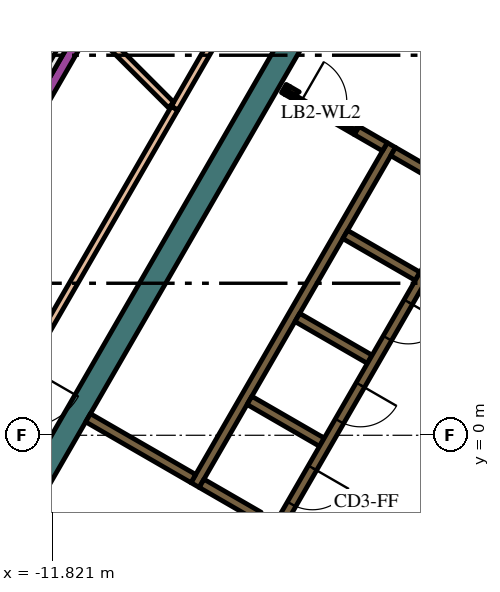
"""IFC4 building model, lengths in metres.
Left out: names, types, materials, properties, quantities, classifications, styles, units other than length and angle.
Written with IfcOpenShell. Run it as: python <this file> out.ifc"""

import sys

from ifc_helpers import new_model, si_unit, direction, frame, frame_2d, origin, place, context, subcontext, project, spatial, polyline, rectangle, outline, extrude, element, fill, save


model = new_model("IFC4")
c1 = context("Model", 3, precision=1e-05, world=origin(), true_north=direction((0.0, 1.0)))
c2 = subcontext(c1, "Body", "Model", "MODEL_VIEW")
j1 = project(units=[si_unit("LENGTHUNIT", "METRE"), si_unit("PLANEANGLEUNIT", "RADIAN")], contexts=[c1])
p1 = place(None, origin())
s1 = spatial("IfcSite", under=j1, at=p1, CompositionType="ELEMENT")
p2 = place(p1, origin())
s2 = spatial("IfcBuilding", under=s1, at=p2, CompositionType="ELEMENT")
p3 = place(p2, frame((0.0, 0.0, 340.2)))
s3 = spatial("IfcBuildingStorey", under=s2, at=p3, CompositionType="ELEMENT", Elevation=340.2)
p4 = place(p3, frame((-4.652, 11.842, 0.0), z_axis=(0.0, 0.0, 1.0), x_axis=(-0.500003640647, -0.866023301845, 0.0)))
e1 = element("IfcWall", 1, at=p4, inside=s3, PredefinedType="SOLIDWALL", context=c2, shape_type="SweptSolid", body=[
    extrude(rectangle(XDim=15.858, YDim=0.6, at=frame_2d((7.929, 0.0))), origin(), (0.0, 0.0, 1.0), 4.2),
])
p5 = place(p3, frame((-8.06, -1.311, 0.0), z_axis=(0.0, 0.0, 1.0), x_axis=(0.50000273126, 0.866023826885, 0.0)))
e2 = element("IfcWall", 2, at=p5, inside=s3, PredefinedType="SOLIDWALL", context=c2, shape_type="SweptSolid", body=[
    extrude(rectangle(XDim=10.33, YDim=0.25, at=frame_2d((5.165, 0.0))), origin(), (0.0, 0.0, 1.0), 4.2),
])
p6 = place(p3, origin())
e3 = element("IfcWall", 3, at=p6, inside=s3, PredefinedType="SOLIDWALL", context=c2, shape_type="SweptSolid", body=[
    extrude(outline(polyline([(-2.912, 7.356), (-2.787, 7.573), (-1.232, 6.675), (-1.303, 6.675), (-1.304, 6.675), (-1.304, 6.675), (-1.304, 6.525), (-1.304, 6.525), (-1.303, 6.525), (-0.971, 6.525), (-0.665, 6.348), (-0.79, 6.132), (-1.007, 6.257), (-1.007, 6.257), (-2.912, 7.356)])), origin(), (0.0, 0.0, 1.0), 4.2),
])
for number, where, z_axis, x_axis in (
    (4, (-2.204, 4.182, 0.0), (0.0, 0.0, 1.0), (-0.866, 0.5, 0.0)),
    (5, (-5.369, 3.1, 0.0), (0.0, 0.0, 1.0), (0.866, -0.5, 0.0)),
    (6, (-4.724, -0.182, 0.0), (0.0, 0.0, 1.0), (-0.866, 0.5, 0.0)),
):
    element("IfcWall", number, at=place(p3, frame(where, z_axis=z_axis, x_axis=x_axis)), inside=s3, PredefinedType="SOLIDWALL", context=c2, shape_type="SweptSolid", body=[
        extrude(rectangle(XDim=2.2, YDim=0.25, at=frame_2d((1.1, 0.0))), origin(), (0.0, 0.0, 1.0), 4.2),
    ])
p7 = place(p3, frame((-7.889, -1.265, 0.0), z_axis=(0.0, 0.0, 1.0), x_axis=(0.865986741702, -0.500066958712, 0.0)))
e7 = element("IfcWall", 7, at=p7, inside=s3, PredefinedType="SOLIDWALL", context=c2, shape_type="SweptSolid", body=[
    extrude(rectangle(XDim=1.738, YDim=0.25, at=frame_2d((0.869, 0.0))), origin(), (0.0, 0.0, 1.0), 4.2),
])
p8 = place(p3, frame((-8.106, -1.14, 0.0), z_axis=(0.0, 0.0, 1.0), x_axis=(-0.866008981251, 0.500028443584, 0.0)))
e8 = element("IfcWall", 8, at=p8, inside=s3, PredefinedType="SOLIDWALL", context=c2, shape_type="SweptSolid", body=[
    extrude(rectangle(XDim=3.2, YDim=0.25, at=frame_2d((1.6, 0.0))), origin(), (0.0, 0.0, 1.0), 4.2),
])
p9 = place(p3, frame((-5.725, 9.125, 0.0), z_axis=(0.0, 0.0, 1.0), x_axis=(0.866185586049, -0.49972245349, 0.0)))
e9 = element("IfcWall", 9, at=p9, inside=s3, PredefinedType="SOLIDWALL", context=c2, shape_type="SweptSolid", body=[
    extrude(rectangle(XDim=0.11, YDim=0.25, at=frame_2d((0.055, 0.0))), origin(), (0.0, 0.0, 1.0), 4.2),
])
p10 = place(p3, frame((-3.066, 7.59, 0.0), z_axis=(0.0, 0.0, 1.0), x_axis=(-0.866081358704, 0.49990307071, 0.0)))
e10 = element("IfcWall", 10, at=p10, inside=s3, PredefinedType="SOLIDWALL", context=c2, shape_type="SweptSolid", body=[
    extrude(rectangle(XDim=0.858, YDim=0.25, at=frame_2d((0.429, 0.0))), origin(), (0.0, 0.0, 1.0), 4.2),
])
e11 = element("IfcWall", 11, at=p6, inside=s3, PredefinedType="SOLIDWALL", context=c2, shape_type="SweptSolid", body=[
    extrude(outline(polyline([(-3.748, 8.128), (-3.813, 8.015), (-4.027, 8.139), (-4.017, 8.156), (-4.008, 8.173), (-4.0, 8.192), (-3.995, 8.21), (-3.991, 8.23), (-3.99, 8.25), (-3.99, 8.268), (-3.748, 8.128)])), origin(), (0.0, 0.0, 1.0), 4.2),
])
e12 = element("IfcWall", 12, at=p6, inside=s3, PredefinedType="SOLIDWALL", context=c2, shape_type="SweptSolid", body=[
    extrude(outline(polyline([(-5.689, 8.96), (-5.69, 8.961), (-5.565, 9.177), (-5.319, 9.035), (-5.335, 9.026), (-5.351, 9.015), (-5.366, 9.002), (-5.379, 8.988), (-5.392, 8.972), (-5.402, 8.956), (-5.412, 8.939), (-5.629, 9.064), (-5.629, 9.064), (-5.689, 8.96)])), origin(), (0.0, 0.0, 1.0), 4.2),
])
e13 = element("IfcWall", 13, at=p6, inside=s3, PredefinedType="PARTITIONING", context=c2, shape_type="SweptSolid", body=[
    extrude(outline(polyline([(2.017, 3.643), (2.342, 3.456), (-1.822, -3.756), (-2.147, -3.568), (2.017, 3.643)])), origin(), (0.0, 0.0, 1.0), 3.45),
])
p11 = place(p3, frame((-0.898, 6.194, 0.0), z_axis=(0.0, 0.0, 1.0), x_axis=(-0.499996202215, -0.866027596426, 0.0)))
e14 = element("IfcWall", 14, at=p11, inside=s3, PredefinedType="SOLIDWALL", context=c2, shape_type="SweptSolid", body=[
    extrude(rectangle(XDim=9.83, YDim=0.25, at=frame_2d((4.915, 0.0))), origin(), (0.0, 0.0, 1.0), 4.2),
])
p12 = place(p11, frame((0.585, 0.0, 0.0)))
e15 = element("IfcOpeningElement", 15, at=p12, cuts=e14, PredefinedType="OPENING", context=c2, shape_type="SweptSolid", body=[
    extrude(rectangle(XDim=1.1, YDim=2.1, at=frame_2d((0.55, 1.05))), frame((0.0, 0.135, 0.0), z_axis=(0.0, -1.0, 0.0), x_axis=(1.0, 0.0, 0.0)), (0.0, 0.0, 1.0), 0.27),
])
p13 = place(p11, frame((3.105, 0.0, 0.0)))
e16 = element("IfcOpeningElement", 16, at=p13, cuts=e14, PredefinedType="OPENING", context=c2, shape_type="SweptSolid", body=[
    extrude(rectangle(XDim=1.1, YDim=2.1, at=frame_2d((0.55, 1.05))), frame((0.0, 0.135, 0.0), z_axis=(0.0, -1.0, 0.0), x_axis=(1.0, 0.0, 0.0)), (0.0, 0.0, 1.0), 0.27),
])
p14 = place(p11, frame((5.625, 0.0, 0.0)))
e17 = element("IfcOpeningElement", 17, at=p14, cuts=e14, PredefinedType="OPENING", context=c2, shape_type="SweptSolid", body=[
    extrude(rectangle(XDim=1.1, YDim=2.1, at=frame_2d((0.55, 1.05))), frame((0.0, 0.135, 0.0), z_axis=(0.0, -1.0, 0.0), x_axis=(1.0, 0.0, 0.0)), (0.0, 0.0, 1.0), 0.27),
])
p15 = place(p11, frame((8.145, 0.0, 0.0)))
e18 = element("IfcOpeningElement", 18, at=p15, cuts=e14, PredefinedType="OPENING", context=c2, shape_type="SweptSolid", body=[
    extrude(rectangle(XDim=1.1, YDim=2.1, at=frame_2d((0.55, 1.05))), frame((0.0, 0.135, 0.0), z_axis=(0.0, -1.0, 0.0), x_axis=(1.0, 0.0, 0.0)), (0.0, 0.0, 1.0), 0.27),
])
p16 = place(p3, frame((-5.659, 9.012, 0.0), z_axis=(0.0, 0.0, 1.0), x_axis=(0.866009402589, -0.500027713859, 0.0)))
e19 = element("IfcWall", 19, at=p16, inside=s3, PredefinedType="PARTITIONING", context=c2, shape_type="SweptSolid", body=[
    extrude(rectangle(XDim=2.1, YDim=0.12, at=frame_2d((1.05, 0.0))), origin(), (0.0, 0.0, 1.0), 3.45),
])
p17 = place(p16, frame((0.45, 0.0, 0.0)))
e20 = element("IfcOpeningElement", 20, at=p17, cuts=e19, PredefinedType="OPENING", context=c2, shape_type="SweptSolid", body=[
    extrude(rectangle(XDim=1.2, YDim=2.1, at=frame_2d((0.6, 1.05))), frame((0.0, 0.07, 0.0), z_axis=(0.0, -1.0, 0.0), x_axis=(1.0, 0.0, 0.0)), (0.0, 0.0, 1.0), 0.14),
])
p18 = place(p3, frame((-8.602, 8.602, 0.0), z_axis=(0.0, 0.0, 1.0), x_axis=(-0.499992973356, -0.866029460581, 0.0)))
e21 = element("IfcWall", 21, at=p18, inside=s3, PredefinedType="PARTITIONING", context=c2, shape_type="SweptSolid", body=[
    extrude(rectangle(XDim=17.265, YDim=0.2, at=frame_2d((8.632, 0.0))), origin(), (0.0, 0.0, 1.0), 3.45),
])
p19 = place(p18, frame((7.833, 0.0, 0.0)))
e22 = element("IfcOpeningElement", 22, at=p19, cuts=e21, PredefinedType="OPENING", context=c2, shape_type="SweptSolid", body=[
    extrude(rectangle(XDim=1.6, YDim=2.1, at=frame_2d((0.8, 1.05))), frame((0.0, 0.11, 0.0), z_axis=(0.0, -1.0, 0.0), x_axis=(1.0, 0.0, 0.0)), (0.0, 0.0, 1.0), 0.22),
])
p20 = place(p3, frame((-3.118, 18.1, 0.0), z_axis=(0.0, 0.0, 1.0), x_axis=(-0.499996953601, -0.866027162616, 0.0)))
e23 = element("IfcWall", 23, at=p20, inside=s3, PredefinedType="PARTITIONING", context=c2, shape_type="SweptSolid", body=[
    extrude(rectangle(XDim=10.958, YDim=0.2, at=frame_2d((5.479, 0.0))), origin(), (0.0, 0.0, 1.0), 3.45),
])
p21 = place(p20, frame((4.879, 0.0, 0.0)))
e24 = element("IfcOpeningElement", 24, at=p21, cuts=e23, PredefinedType="OPENING", context=c2, shape_type="SweptSolid", body=[
    extrude(rectangle(XDim=1.2, YDim=2.1, at=frame_2d((0.6, 1.05))), frame((0.0, 0.11, 0.0), z_axis=(0.0, -1.0, 0.0), x_axis=(1.0, 0.0, 0.0)), (0.0, 0.0, 1.0), 0.22),
])
p22 = place(p3, frame((-8.694, 8.694, 0.0), z_axis=(0.0, 0.0, 1.0), x_axis=(-0.707106781187, 0.707106781187, 0.0)))
e25 = element("IfcWall", 25, at=p22, inside=s3, PredefinedType="PARTITIONING", context=c2, shape_type="SweptSolid", body=[
    extrude(rectangle(XDim=3.224, YDim=0.2, at=frame_2d((1.612, 0.0))), origin(), (0.0, 0.0, 1.0), 3.45),
])
p23 = place(p3, frame((-7.54, 16.64, 0.0), z_axis=(0.0, 0.0, 1.0), x_axis=(-0.500002158106, -0.866024157798, 0.0)))
e26 = element("IfcWall", 26, at=p23, inside=s3, PredefinedType="SOLIDWALL", context=c2, shape_type="SweptSolid", body=[
    extrude(rectangle(XDim=21.282, YDim=0.3, at=frame_2d((10.641, 0.0))), origin(), (0.0, 0.0, 1.0), 3.45),
])
p24 = place(p13, origin())
e27 = element("IfcDoor", 27, at=p24, inside=s3, OperationType="DOUBLE_DOOR_SLIDING", PredefinedType="DOOR", context=c2, shape_type="SweptSolid", body=[
    extrude(rectangle(XDim=1.1, YDim=2.1, at=frame_2d((0.55, 1.05))), frame((0.0, 0.025, 0.0), z_axis=(0.0, -1.0, 0.0), x_axis=(1.0, 0.0, 0.0)), (0.0, 0.0, 1.0), 0.05),
])
fill(e16, e27)
p25 = place(p14, origin())
e28 = element("IfcDoor", 28, at=p25, inside=s3, OperationType="DOUBLE_DOOR_SLIDING", PredefinedType="DOOR", context=c2, shape_type="SweptSolid", body=[
    extrude(rectangle(XDim=1.1, YDim=2.1, at=frame_2d((0.55, 1.05))), frame((0.0, 0.025, 0.0), z_axis=(0.0, -1.0, 0.0), x_axis=(1.0, 0.0, 0.0)), (0.0, 0.0, 1.0), 0.05),
])
fill(e17, e28)
p26 = place(p15, origin())
e29 = element("IfcDoor", 29, at=p26, inside=s3, OperationType="DOUBLE_DOOR_SLIDING", PredefinedType="DOOR", context=c2, shape_type="SweptSolid", body=[
    extrude(rectangle(XDim=1.1, YDim=2.1, at=frame_2d((0.55, 1.05))), frame((0.0, 0.025, 0.0), z_axis=(0.0, -1.0, 0.0), x_axis=(1.0, 0.0, 0.0)), (0.0, 0.0, 1.0), 0.05),
])
fill(e18, e29)
p27 = place(p17, origin())
e30 = element("IfcDoor", 30, at=p27, inside=s3, OperationType="SINGLE_SWING_LEFT", PredefinedType="DOOR", context=c2, shape_type="SweptSolid", body=[
    extrude(rectangle(XDim=1.2, YDim=2.1, at=frame_2d((0.6, 1.05))), frame((0.0, 0.025, 0.0), z_axis=(0.0, -1.0, 0.0), x_axis=(1.0, 0.0, 0.0)), (0.0, 0.0, 1.0), 0.05),
])
fill(e20, e30)
save(model, sys.argv[1])
